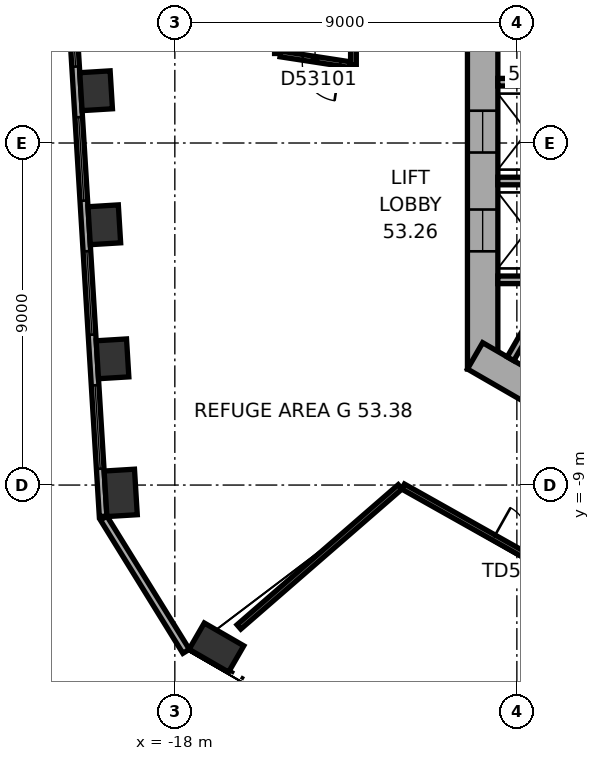
"""IFC4 building model, lengths in metres.
Left out: names, types, materials, properties, quantities, classifications, styles, units other than length and angle.
Written with IfcOpenShell. Run it as: python <this file> out.ifc"""

import sys

from ifc_helpers import new_model, si_unit, direction, frame, frame_2d, origin, origin_2d, place, context, subcontext, project, spatial, rectangle, extrude, element, fill, save


model = new_model("IFC4")
c1 = context("Model", 3, precision=1e-05, world=origin(), true_north=direction((0.0, 1.0)))
c2 = subcontext(c1, "Body", "Model", "MODEL_VIEW")
j1 = project(units=[si_unit("LENGTHUNIT", "METRE"), si_unit("PLANEANGLEUNIT", "RADIAN")], contexts=[c1])
p1 = place(None, origin())
s1 = spatial("IfcSite", under=j1, at=p1, CompositionType="ELEMENT")
p2 = place(p1, origin())
s2 = spatial("IfcBuilding", under=s1, at=p2, CompositionType="ELEMENT")
p3 = place(p2, frame((0.0, 0.0, 214.3)))
s3 = spatial("IfcBuildingStorey", under=s2, at=p3, CompositionType="ELEMENT", Elevation=214.3)
for number, where, z_axis, x_axis in (
    (1, (-20.071, 1.375, 0.0), (0.0, 0.0, 1.0), (0.061, -0.998, 0.0)),
    (2, (-19.856, -2.152, 0.0), (0.0, 0.0, 1.0), (0.061, -0.998, 0.0)),
    (3, (-19.64, -5.679, 0.0), (0.0, 0.0, 1.0), (0.061, -0.998, 0.0)),
):
    element("IfcColumn", number, at=place(p3, frame(where, z_axis=z_axis, x_axis=x_axis)), inside=s3, PredefinedType="COLUMN", context=c2, shape_type="SweptSolid", body=[
        extrude(rectangle(XDim=1.0, YDim=0.8, at=origin_2d()), origin(), (0.0, 0.0, 1.0), 7.4),
    ])
for number, where, z_axis, x_axis in (
    (4, (-19.424, -9.206, 0.0), (0.0, 0.0, 1.0), (0.061, -0.998, 0.0)),
    (5, (-16.906, -13.276, 0.0), (0.0, 0.0, 1.0), (0.866, -0.5, 0.0)),
):
    element("IfcColumn", number, at=place(p3, frame(where, z_axis=z_axis, x_axis=x_axis)), inside=s3, PredefinedType="COLUMN", context=c2, shape_type="SweptSolid", body=[
        extrude(rectangle(XDim=1.2, YDim=0.8, at=origin_2d()), origin(), (0.0, 0.0, 1.0), 7.4),
    ])
p4 = place(p3, frame((-9.9, 5.947, 0.0), z_axis=(0.0, 0.0, 1.0), x_axis=(0.0, -1.0, 0.0)))
e6 = element("IfcWall", 6, at=p4, inside=s3, PredefinedType="SHEAR", context=c2, shape_type="SweptSolid", body=[
    extrude(rectangle(XDim=11.894, YDim=0.8, at=frame_2d((5.947, 0.0))), origin(), (0.0, 0.0, 1.0), 7.4),
])
p5 = place(p4, frame((5.097, 0.0, 0.0)))
e7 = element("IfcOpeningElement", 7, at=p5, cuts=e6, PredefinedType="OPENING", context=c2, shape_type="SweptSolid", body=[
    extrude(rectangle(XDim=1.1, YDim=2.1, at=frame_2d((0.55, 1.05))), frame((0.0, 0.41, 0.0), z_axis=(0.0, -1.0, 0.0), x_axis=(1.0, 0.0, 0.0)), (0.0, 0.0, 1.0), 0.82),
])
p6 = place(p4, frame((7.697, 0.0, 0.0)))
e8 = element("IfcOpeningElement", 8, at=p6, cuts=e6, PredefinedType="OPENING", context=c2, shape_type="SweptSolid", body=[
    extrude(rectangle(XDim=1.1, YDim=2.1, at=frame_2d((0.55, 1.05))), frame((0.0, 0.41, 0.0), z_axis=(0.0, -1.0, 0.0), x_axis=(1.0, 0.0, 0.0)), (0.0, 0.0, 1.0), 0.82),
])
p7 = place(p3, frame((-10.1, -5.6, 0.0), z_axis=(0.0, 0.0, 1.0), x_axis=(0.866023897231, -0.500002609418, 0.0)))
e9 = element("IfcWall", 9, at=p7, inside=s3, PredefinedType="SHEAR", context=c2, shape_type="SweptSolid", body=[
    extrude(rectangle(XDim=11.894, YDim=0.8, at=frame_2d((5.947, 0.0))), origin(), (0.0, 0.0, 1.0), 7.4),
])
p8 = place(p7, frame((6.147, 0.0, 0.0)))
e10 = element("IfcOpeningElement", 10, at=p8, cuts=e9, PredefinedType="OPENING", context=c2, shape_type="SweptSolid", body=[
    extrude(rectangle(XDim=1.5, YDim=2.1, at=frame_2d((0.75, 1.05))), frame((0.0, 0.41, 0.0), z_axis=(0.0, -1.0, 0.0), x_axis=(1.0, 0.0, 0.0)), (0.0, 0.0, 1.0), 0.82),
])
p9 = place(p7, frame((1.597, 0.0, 0.0)))
e11 = element("IfcOpeningElement", 11, at=p9, cuts=e9, PredefinedType="OPENING", context=c2, shape_type="SweptSolid", body=[
    extrude(rectangle(XDim=1.1, YDim=2.1, at=frame_2d((0.55, 1.05))), frame((0.0, 0.41, 0.0), z_axis=(0.0, -1.0, 0.0), x_axis=(1.0, 0.0, 0.0)), (0.0, 0.0, 1.0), 0.82),
])
p10 = place(p7, frame((4.197, 0.0, 0.0)))
e12 = element("IfcOpeningElement", 12, at=p10, cuts=e9, PredefinedType="OPENING", context=c2, shape_type="SweptSolid", body=[
    extrude(rectangle(XDim=1.1, YDim=2.1, at=frame_2d((0.55, 1.05))), frame((0.0, 0.41, 0.0), z_axis=(0.0, -1.0, 0.0), x_axis=(1.0, 0.0, 0.0)), (0.0, 0.0, 1.0), 0.82),
])
p11 = place(p3, frame((-21.038, 8.984, 0.0), z_axis=(0.0, 0.0, 1.0), x_axis=(0.061043935634, -0.998135079998, 0.0)))
e13 = element("IfcWall", 13, at=p11, inside=s3, PredefinedType="STANDARD", context=c2, shape_type="SweptSolid", body=[
    extrude(rectangle(XDim=18.841, YDim=0.2, at=frame_2d((9.421, 0.0))), origin(), (0.0, 0.0, 1.0), 7.4),
])
p12 = place(p11, frame((1.253, 0.0, 0.8)))
e14 = element("IfcOpeningElement", 14, at=p12, cuts=e13, PredefinedType="OPENING", context=c2, shape_type="SweptSolid", body=[
    extrude(rectangle(XDim=2.2, YDim=4.2, at=frame_2d((1.1, 2.1))), frame((0.0, 0.11, 0.0), z_axis=(0.0, -1.0, 0.0), x_axis=(1.0, 0.0, 0.0)), (0.0, 0.0, 1.0), 0.22),
])
p13 = place(p11, frame((4.786, 0.0, 0.8)))
e15 = element("IfcOpeningElement", 15, at=p13, cuts=e13, PredefinedType="OPENING", context=c2, shape_type="SweptSolid", body=[
    extrude(rectangle(XDim=2.2, YDim=4.2, at=frame_2d((1.1, 2.1))), frame((0.0, 0.11, 0.0), z_axis=(0.0, -1.0, 0.0), x_axis=(1.0, 0.0, 0.0)), (0.0, 0.0, 1.0), 0.22),
])
p14 = place(p11, frame((8.32, 0.0, 0.8)))
e16 = element("IfcOpeningElement", 16, at=p14, cuts=e13, PredefinedType="OPENING", context=c2, shape_type="SweptSolid", body=[
    extrude(rectangle(XDim=2.2, YDim=4.2, at=frame_2d((1.1, 2.1))), frame((0.0, 0.11, 0.0), z_axis=(0.0, -1.0, 0.0), x_axis=(1.0, 0.0, 0.0)), (0.0, 0.0, 1.0), 0.22),
])
p15 = place(p11, frame((11.854, 0.0, 0.8)))
e17 = element("IfcOpeningElement", 17, at=p15, cuts=e13, PredefinedType="OPENING", context=c2, shape_type="SweptSolid", body=[
    extrude(rectangle(XDim=2.2, YDim=4.2, at=frame_2d((1.1, 2.1))), frame((0.0, 0.11, 0.0), z_axis=(0.0, -1.0, 0.0), x_axis=(1.0, 0.0, 0.0)), (0.0, 0.0, 1.0), 0.22),
])
p16 = place(p11, frame((15.387, 0.0, 0.8)))
e18 = element("IfcOpeningElement", 18, at=p16, cuts=e13, PredefinedType="OPENING", context=c2, shape_type="SweptSolid", body=[
    extrude(rectangle(XDim=2.2, YDim=4.2, at=frame_2d((1.1, 2.1))), frame((0.0, 0.11, 0.0), z_axis=(0.0, -1.0, 0.0), x_axis=(1.0, 0.0, 0.0)), (0.0, 0.0, 1.0), 0.22),
])
p17 = place(p3, frame((-19.873, -9.869, 0.0), z_axis=(0.0, 0.0, 1.0), x_axis=(0.526230246673, -0.850342123787, 0.0)))
e19 = element("IfcWall", 19, at=p17, inside=s3, PredefinedType="STANDARD", context=c2, shape_type="SweptSolid", body=[
    extrude(rectangle(XDim=4.123, YDim=0.2, at=frame_2d((2.061, 0.0))), origin(), (0.0, 0.0, 1.0), 7.4),
])
p18 = place(p3, frame((0.69, -16.171, 0.0), z_axis=(0.0, 0.0, 1.0), x_axis=(-0.871655280677, 0.490119446326, 0.0)))
e20 = element("IfcWall", 20, at=p18, inside=s3, PredefinedType="STANDARD", context=c2, shape_type="SweptSolid", body=[
    extrude(rectangle(XDim=14.552, YDim=0.15, at=frame_2d((7.276, 0.0))), origin(), (0.0, 0.0, 1.0), 2.6),
])
p19 = place(p18, frame((2.738, 0.0, 0.0)))
e21 = element("IfcOpeningElement", 21, at=p19, cuts=e20, PredefinedType="OPENING", context=c2, shape_type="SweptSolid", body=[
    extrude(rectangle(XDim=1.8, YDim=2.4, at=frame_2d((0.9, 1.2))), frame((0.0, 0.085, 0.0), z_axis=(0.0, -1.0, 0.0), x_axis=(1.0, 0.0, 0.0)), (0.0, 0.0, 1.0), 0.17),
])
p20 = place(p18, frame((10.014, 0.0, 0.0)))
e22 = element("IfcOpeningElement", 22, at=p20, cuts=e20, PredefinedType="OPENING", context=c2, shape_type="SweptSolid", body=[
    extrude(rectangle(XDim=1.8, YDim=2.4, at=frame_2d((0.9, 1.2))), frame((0.0, 0.085, 0.0), z_axis=(0.0, -1.0, 0.0), x_axis=(1.0, 0.0, 0.0)), (0.0, 0.0, 1.0), 0.17),
])
p21 = place(p3, frame((-12.072, -9.047, 0.0), z_axis=(0.0, 0.0, 1.0), x_axis=(-0.754779474902, -0.655978615708, 0.0)))
e23 = element("IfcWall", 23, at=p21, inside=s3, PredefinedType="STANDARD", context=c2, shape_type="SweptSolid", body=[
    extrude(rectangle(XDim=5.619, YDim=0.15, at=frame_2d((2.81, 0.0))), origin(), (0.0, 0.0, 1.0), 2.6),
])
for number, where, z_axis, x_axis in (
    (24, (-7.3, 1.6, 0.0), (0.0, 0.0, 1.0), (-1.0, 0.0, 0.0)),
    (25, (-7.3, -1.0, 0.0), (0.0, 0.0, 1.0), (-1.0, 0.0, 0.0)),
    (26, (-7.3, -3.6, 0.0), (0.0, 0.0, 1.0), (-1.0, 0.0, 0.0)),
    (27, (-8.067, -3.772, 0.0), (0.0, 0.0, 1.0), (-0.5, -0.866, 0.0)),
):
    element("IfcWall", number, at=place(p3, frame(where, z_axis=z_axis, x_axis=x_axis)), inside=s3, PredefinedType="PARTITIONING", context=c2, shape_type="SweptSolid", body=[
        extrude(rectangle(XDim=2.2, YDim=0.2, at=frame_2d((1.1, 0.0))), origin(), (0.0, 0.0, 1.0), 7.12),
    ])
p22 = place(p3, frame((-13.399, 2.063, 0.0), z_axis=(0.0, 0.0, 1.0), x_axis=(-0.988354850272, 0.152166651878, 0.0)))
e28 = element("IfcWall", 28, at=p22, inside=s3, PredefinedType="PARTITIONING", context=c2, shape_type="SweptSolid", body=[
    extrude(rectangle(XDim=1.844, YDim=0.15, at=frame_2d((0.922, 0.0))), origin(), (0.0, 0.0, 1.0), 7.12),
])
p23 = place(p22, frame((0.25, 0.0, 0.0)))
e29 = element("IfcOpeningElement", 29, at=p23, cuts=e28, PredefinedType="OPENING", context=c2, shape_type="SweptSolid", body=[
    extrude(rectangle(XDim=1.0, YDim=2.1, at=frame_2d((0.5, 1.05))), frame((0.0, 0.085, 0.0), z_axis=(0.0, -1.0, 0.0), x_axis=(1.0, 0.0, 0.0)), (0.0, 0.0, 1.0), 0.17),
])
p24 = place(p3, frame((-15.3, 2.355, 0.0), z_axis=(0.0, 0.0, 1.0), x_axis=(0.0, 1.0, 0.0)))
e30 = element("IfcWall", 30, at=p24, inside=s3, PredefinedType="PARTITIONING", context=c2, shape_type="SweptSolid", body=[
    extrude(rectangle(XDim=2.606, YDim=0.15, at=frame_2d((1.303, 0.0))), origin(), (0.0, 0.0, 1.0), 7.12),
])
p25 = place(p3, frame((-13.3, 4.233, 0.0), z_axis=(0.0, 0.0, 1.0), x_axis=(0.0, -1.0, 0.0)))
e31 = element("IfcWall", 31, at=p25, inside=s3, PredefinedType="PARTITIONING", context=c2, shape_type="SweptSolid", body=[
    extrude(rectangle(XDim=2.185, YDim=0.15, at=frame_2d((1.093, 0.0))), origin(), (0.0, 0.0, 1.0), 7.12),
])
p26 = place(p13, origin())
e32 = element("IfcWindow", 32, at=p26, inside=s3, PartitioningType="SINGLE_PANEL", PredefinedType="WINDOW", context=c2, shape_type="SweptSolid", body=[
    extrude(rectangle(XDim=2.2, YDim=4.2, at=frame_2d((1.1, 2.1))), frame((0.0, 0.03, 0.0), z_axis=(0.0, -1.0, 0.0), x_axis=(1.0, 0.0, 0.0)), (0.0, 0.0, 1.0), 0.06),
])
fill(e15, e32)
p27 = place(p14, origin())
e33 = element("IfcWindow", 33, at=p27, inside=s3, PartitioningType="SINGLE_PANEL", PredefinedType="WINDOW", context=c2, shape_type="SweptSolid", body=[
    extrude(rectangle(XDim=2.2, YDim=4.2, at=frame_2d((1.1, 2.1))), frame((0.0, 0.03, 0.0), z_axis=(0.0, -1.0, 0.0), x_axis=(1.0, 0.0, 0.0)), (0.0, 0.0, 1.0), 0.06),
])
fill(e16, e33)
p28 = place(p15, origin())
e34 = element("IfcWindow", 34, at=p28, inside=s3, PartitioningType="SINGLE_PANEL", PredefinedType="WINDOW", context=c2, shape_type="SweptSolid", body=[
    extrude(rectangle(XDim=2.2, YDim=4.2, at=frame_2d((1.1, 2.1))), frame((0.0, 0.03, 0.0), z_axis=(0.0, -1.0, 0.0), x_axis=(1.0, 0.0, 0.0)), (0.0, 0.0, 1.0), 0.06),
])
fill(e17, e34)
p29 = place(p16, origin())
e35 = element("IfcWindow", 35, at=p29, inside=s3, PartitioningType="SINGLE_PANEL", PredefinedType="WINDOW", context=c2, shape_type="SweptSolid", body=[
    extrude(rectangle(XDim=2.2, YDim=4.2, at=frame_2d((1.1, 2.1))), frame((0.0, 0.03, 0.0), z_axis=(0.0, -1.0, 0.0), x_axis=(1.0, 0.0, 0.0)), (0.0, 0.0, 1.0), 0.06),
])
fill(e18, e35)
p30 = place(p20, origin())
e36 = element("IfcDoor", 36, at=p30, inside=s3, OperationType="DOUBLE_DOOR_DOUBLE_SWING", PredefinedType="DOOR", context=c2, shape_type="SweptSolid", body=[
    extrude(rectangle(XDim=1.8, YDim=2.4, at=frame_2d((0.9, 1.2))), frame((0.0, 0.025, 0.0), z_axis=(0.0, -1.0, 0.0), x_axis=(1.0, 0.0, 0.0)), (0.0, 0.0, 1.0), 0.05),
])
fill(e22, e36)
p31 = place(p5, origin())
e37 = element("IfcDoor", 37, at=p31, inside=s3, OperationType="DOUBLE_DOOR_SLIDING", PredefinedType="DOOR", context=c2, shape_type="SweptSolid", body=[
    extrude(rectangle(XDim=1.1, YDim=2.1, at=frame_2d((0.55, 1.05))), frame((0.0, 0.025, 0.0), z_axis=(0.0, -1.0, 0.0), x_axis=(1.0, 0.0, 0.0)), (0.0, 0.0, 1.0), 0.05),
])
fill(e7, e37)
p32 = place(p6, origin())
e38 = element("IfcDoor", 38, at=p32, inside=s3, OperationType="DOUBLE_DOOR_SLIDING", PredefinedType="DOOR", context=c2, shape_type="SweptSolid", body=[
    extrude(rectangle(XDim=1.1, YDim=2.1, at=frame_2d((0.55, 1.05))), frame((0.0, 0.025, 0.0), z_axis=(0.0, -1.0, 0.0), x_axis=(1.0, 0.0, 0.0)), (0.0, 0.0, 1.0), 0.05),
])
fill(e8, e38)
p33 = place(p23, origin())
e39 = element("IfcDoor", 39, at=p33, inside=s3, OperationType="SINGLE_SWING_LEFT", PredefinedType="DOOR", context=c2, shape_type="SweptSolid", body=[
    extrude(rectangle(XDim=1.0, YDim=2.1, at=frame_2d((0.5, 1.05))), frame((0.0, 0.025, 0.0), z_axis=(0.0, -1.0, 0.0), x_axis=(1.0, 0.0, 0.0)), (0.0, 0.0, 1.0), 0.05),
])
fill(e29, e39)
save(model, sys.argv[1])
